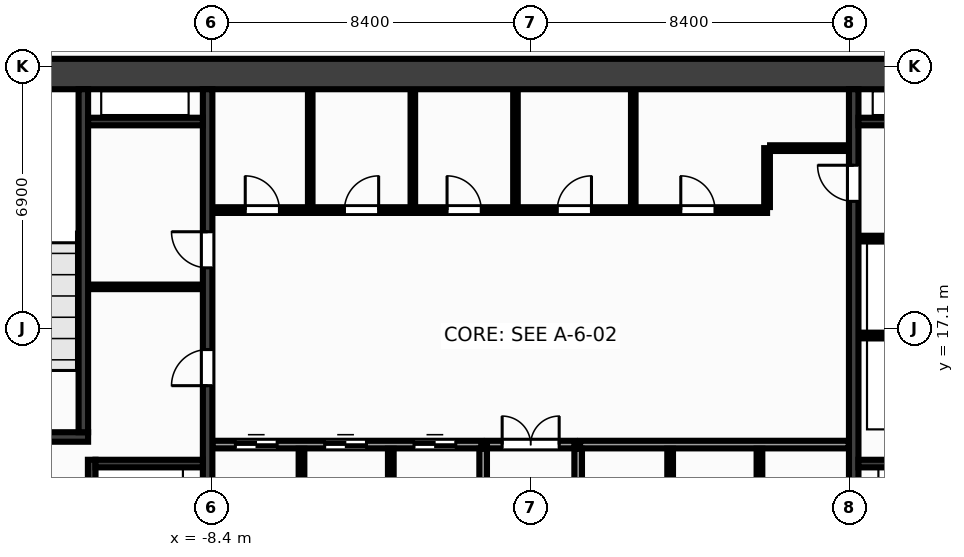
"""IFC4 building model, lengths in metres.
Left out: names, types, materials, properties, quantities, classifications, styles, units other than length and angle.
Written with IfcOpenShell. Run it as: python <this file> out.ifc"""

import sys

from ifc_helpers import new_model, si_unit, direction, frame, frame_2d, origin, place, context, subcontext, project, spatial, rectangle, extrude, source, transform, mapped, element, fill, save


model = new_model("IFC4")
c1 = context("Model", 3, precision=1e-05, world=origin(), true_north=direction((0.0, 1.0)))
c2 = subcontext(c1, "Body", "Model", "MODEL_VIEW")
j1 = project(units=[si_unit("LENGTHUNIT", "METRE"), si_unit("PLANEANGLEUNIT", "RADIAN")], contexts=[c1])
p1 = place(None, origin())
s1 = spatial("IfcSite", under=j1, at=p1, CompositionType="ELEMENT")
p2 = place(p1, origin())
s2 = spatial("IfcBuilding", under=s1, at=p2, CompositionType="ELEMENT")
p3 = place(p2, frame((0.0, 0.0, 18.95)))
s3 = spatial("IfcBuildingStorey", under=s2, at=p3, CompositionType="ELEMENT", Elevation=18.95)
m1 = source(origin(), c2, "Body", "SweptSolid", [
    extrude(rectangle(XDim=32.0, YDim=0.8, at=frame_2d((16.0, 0.0))), origin(), (0.0, 0.0, 1.0), 4.65),
])
p4 = place(p3, frame((-16.0, 23.8, 0.0), z_axis=(0.0, 0.0, 1.0), x_axis=(1.0, 0.0, 0.0)))
e1 = element("IfcWall", 1, at=p4, inside=s3, PredefinedType="SHEAR", context=c2, shape_type="MappedRepresentation", body=[
    mapped(m1, transform((0.0, 0.0, 0.0), x_axis=(1.0, 0.0, 0.0), y_axis=(0.0, 1.0, 0.0), z_axis=(0.0, 0.0, 1.0), scale=1.0)),
])
m2 = source(origin(), c2, "Body", "SweptSolid", [
    extrude(rectangle(XDim=12.8, YDim=0.25, at=frame_2d((6.4, 0.0))), origin(), (0.0, 0.0, 1.0), 4.65),
])
p5 = place(p3, frame((-8.5, 10.6, 0.0), z_axis=(0.0, 0.0, 1.0), x_axis=(0.0, 1.0, 0.0)))
e2 = element("IfcWall", 2, at=p5, inside=s3, PredefinedType="SHEAR", context=c2, shape_type="MappedRepresentation", body=[
    mapped(m2, transform((0.0, 0.0, 0.0), x_axis=(1.0, 0.0, 0.0), y_axis=(0.0, 1.0, 0.0), z_axis=(0.0, 0.0, 1.0), scale=1.0)),
])
p6 = place(p5, frame((5.0, 0.0, 0.0)))
e3 = element("IfcOpeningElement", 3, at=p6, cuts=e2, PredefinedType="OPENING", context=c2, shape_type="SweptSolid", body=[
    extrude(rectangle(XDim=0.95, YDim=2.15, at=frame_2d((0.475, 1.075))), frame((0.0, 0.137, 0.0), z_axis=(0.0, -1.0, 0.0), x_axis=(1.0, 0.0, 0.0)), (0.0, 0.0, 1.0), 0.274),
])
p7 = place(p5, frame((8.1, 0.0, 0.0)))
e4 = element("IfcOpeningElement", 4, at=p7, cuts=e2, PredefinedType="OPENING", context=c2, shape_type="SweptSolid", body=[
    extrude(rectangle(XDim=0.95, YDim=2.15, at=frame_2d((0.475, 1.075))), frame((0.0, 0.137, 0.0), z_axis=(0.0, -1.0, 0.0), x_axis=(1.0, 0.0, 0.0)), (0.0, 0.0, 1.0), 0.274),
])
p8 = place(p3, frame((8.5, 10.6, 0.0), z_axis=(0.0, 0.0, 1.0), x_axis=(0.0, 1.0, 0.0)))
e5 = element("IfcWall", 5, at=p8, inside=s3, PredefinedType="SHEAR", context=c2, shape_type="MappedRepresentation", body=[
    mapped(m2, transform((0.0, 0.0, 0.0), x_axis=(1.0, 0.0, 0.0), y_axis=(0.0, 1.0, 0.0), z_axis=(0.0, 0.0, 1.0), scale=1.0)),
])
p9 = place(p8, frame((9.85, 0.0, 0.0)))
e6 = element("IfcOpeningElement", 6, at=p9, cuts=e5, PredefinedType="OPENING", context=c2, shape_type="SweptSolid", body=[
    extrude(rectangle(XDim=0.95, YDim=2.15, at=frame_2d((0.475, 1.075))), frame((0.0, 0.137, 0.0), z_axis=(0.0, -1.0, 0.0), x_axis=(1.0, 0.0, 0.0)), (0.0, 0.0, 1.0), 0.274),
])
m3 = source(origin(), c2, "Body", "SweptSolid", [
    extrude(rectangle(XDim=3.555, YDim=0.25, at=frame_2d((1.777, 0.0))), origin(), (0.0, 0.0, 1.0), 4.65),
])
p10 = place(p3, frame((-15.2, 14.25, 0.0), z_axis=(0.0, 0.0, 1.0), x_axis=(1.0, 0.0, 0.0)))
e7 = element("IfcWall", 7, at=p10, inside=s3, PredefinedType="SHEAR", context=c2, shape_type="MappedRepresentation", body=[
    mapped(m3, transform((0.0, 0.0, 0.0), x_axis=(1.0, 0.0, 0.0), y_axis=(0.0, 1.0, 0.0), z_axis=(0.0, 0.0, 1.0), scale=1.0)),
])
p11 = place(p10, frame((0.95, 0.0, 0.0)))
e8 = element("IfcOpeningElement", 8, at=p11, cuts=e7, PredefinedType="OPENING", context=c2, shape_type="SweptSolid", body=[
    extrude(rectangle(XDim=1.6, YDim=2.15, at=frame_2d((0.8, 1.075))), frame((0.0, 0.137, 0.0), z_axis=(0.0, -1.0, 0.0), x_axis=(1.0, 0.0, 0.0)), (0.0, 0.0, 1.0), 0.274),
])
m4 = source(origin(), c2, "Body", "SweptSolid", [
    extrude(rectangle(XDim=9.025, YDim=0.25, at=frame_2d((4.512, 0.0))), origin(), (0.0, 0.0, 1.0), 4.65),
])
p12 = place(p3, frame((-11.77, 14.375, 0.0), z_axis=(0.0, 0.0, 1.0), x_axis=(0.0, 1.0, 0.0)))
e9 = element("IfcWall", 9, at=p12, inside=s3, PredefinedType="SHEAR", context=c2, shape_type="MappedRepresentation", body=[
    mapped(m4, transform((0.0, 0.0, 0.0), x_axis=(1.0, 0.0, 0.0), y_axis=(0.0, 1.0, 0.0), z_axis=(0.0, 0.0, 1.0), scale=1.0)),
])
m5 = source(origin(), c2, "Body", "SweptSolid", [
    extrude(rectangle(XDim=3.05, YDim=0.2, at=frame_2d((1.525, 0.0))), origin(), (0.0, 0.0, 1.0), 4.65),
])
p13 = place(p3, frame((-11.55, 10.6, 0.0), z_axis=(0.0, 0.0, 1.0), x_axis=(0.0, 1.0, 0.0)))
e10 = element("IfcWall", 10, at=p13, inside=s3, PredefinedType="SHEAR", context=c2, shape_type="MappedRepresentation", body=[
    mapped(m5, transform((0.0, 0.0, 0.0), x_axis=(1.0, 0.0, 0.0), y_axis=(0.0, 1.0, 0.0), z_axis=(0.0, 0.0, 1.0), scale=1.0)),
])
p14 = place(p13, frame((0.9, 0.0, 0.0)))
e11 = element("IfcOpeningElement", 11, at=p14, cuts=e10, PredefinedType="OPENING", context=c2, shape_type="SweptSolid", body=[
    extrude(rectangle(XDim=1.1, YDim=2.15, at=frame_2d((0.55, 1.075))), frame((0.0, 0.112, 0.0), z_axis=(0.0, -1.0, 0.0), x_axis=(1.0, 0.0, 0.0)), (0.0, 0.0, 1.0), 0.224),
])
m6 = source(origin(), c2, "Body", "SweptSolid", [
    extrude(rectangle(XDim=2.825, YDim=0.2, at=frame_2d((1.413, 0.0))), origin(), (0.0, 0.0, 1.0), 4.65),
])
for number, where, z_axis, x_axis in (
    (12, (-11.45, 13.55, 0.0), (0.0, 0.0, 1.0), (1.0, 0.0, 0.0)),
    (13, (8.625, 13.55, 0.0), (0.0, 0.0, 1.0), (1.0, 0.0, 0.0)),
):
    element("IfcWall", number, at=place(p3, frame(where, z_axis=z_axis, x_axis=x_axis)), inside=s3, PredefinedType="SHEAR", context=c2, shape_type="MappedRepresentation", body=[
        mapped(m6, transform((0.0, 0.0, 0.0), x_axis=(1.0, 0.0, 0.0), y_axis=(0.0, 1.0, 0.0), z_axis=(0.0, 0.0, 1.0), scale=1.0)),
    ])
m7 = source(origin(), c2, "Body", "SweptSolid", [
    extrude(rectangle(XDim=3.02, YDim=0.2, at=frame_2d((1.51, 0.0))), origin(), (0.0, 0.0, 1.0), 4.65),
])
for number, where, z_axis, x_axis in (
    (14, (-11.645, 22.55, 0.0), (0.0, 0.0, 1.0), (1.0, 0.0, 0.0)),
    (15, (8.625, 22.55, 0.0), (0.0, 0.0, 1.0), (1.0, 0.0, 0.0)),
):
    element("IfcWall", number, at=place(p3, frame(where, z_axis=z_axis, x_axis=x_axis)), inside=s3, PredefinedType="SHEAR", context=c2, shape_type="MappedRepresentation", body=[
        mapped(m7, transform((0.0, 0.0, 0.0), x_axis=(1.0, 0.0, 0.0), y_axis=(0.0, 1.0, 0.0), z_axis=(0.0, 0.0, 1.0), scale=1.0)),
    ])
m8 = source(origin(), c2, "Body", "SweptSolid", [
    extrude(rectangle(XDim=3.01, YDim=0.12, at=frame_2d((1.505, 0.0))), origin(), (0.0, 0.0, 1.0), 4.41),
])
p15 = place(p3, frame((-11.64, 18.2, 0.0), z_axis=(0.0, 0.0, 1.0), x_axis=(1.0, 0.0, 0.0)))
e16 = element("IfcWall", 16, at=p15, inside=s3, PredefinedType="PARTITIONING", context=c2, shape_type="MappedRepresentation", body=[
    mapped(m8, transform((0.0, 0.0, 0.0), x_axis=(1.0, 0.0, 0.0), y_axis=(0.0, 1.0, 0.0), z_axis=(0.0, 0.0, 1.0), scale=1.0)),
])
m9 = source(origin(), c2, "Body", "SweptSolid", [
    extrude(rectangle(XDim=3.01, YDim=0.15, at=frame_2d((1.505, 0.0))), origin(), (0.0, 0.0, 1.0), 4.41),
])
for number, where, z_axis, x_axis in (
    (17, (8.63, 16.92, 0.0), (0.0, 0.0, 1.0), (1.0, 0.0, 0.0)),
    (18, (8.63, 19.47, 0.0), (0.0, 0.0, 1.0), (1.0, 0.0, 0.0)),
):
    element("IfcWall", number, at=place(p3, frame(where, z_axis=z_axis, x_axis=x_axis)), inside=s3, PredefinedType="PARTITIONING", context=c2, shape_type="MappedRepresentation", body=[
        mapped(m9, transform((0.0, 0.0, 0.0), x_axis=(1.0, 0.0, 0.0), y_axis=(0.0, 1.0, 0.0), z_axis=(0.0, 0.0, 1.0), scale=1.0)),
    ])
m10 = source(origin(), c2, "Body", "SweptSolid", [
    extrude(rectangle(XDim=7.07, YDim=0.2, at=frame_2d((3.535, 0.0))), origin(), (0.0, 0.0, 1.0), 4.41),
])
p16 = place(p3, frame((-8.37, 14.05, 0.0), z_axis=(0.0, 0.0, 1.0), x_axis=(1.0, 0.0, 0.0)))
e19 = element("IfcWall", 19, at=p16, inside=s3, PredefinedType="PARTITIONING", context=c2, shape_type="MappedRepresentation", body=[
    mapped(m10, transform((0.0, 0.0, 0.0), x_axis=(1.0, 0.0, 0.0), y_axis=(0.0, 1.0, 0.0), z_axis=(0.0, 0.0, 1.0), scale=1.0)),
])
p17 = place(p16, frame((0.6, 0.0, 0.0)))
e20 = element("IfcOpeningElement", 20, at=p17, cuts=e19, PredefinedType="OPENING", context=c2, shape_type="SweptSolid", body=[
    extrude(rectangle(XDim=1.1, YDim=2.15, at=frame_2d((0.55, 1.075))), frame((0.0, 0.112, 0.0), z_axis=(0.0, -1.0, 0.0), x_axis=(1.0, 0.0, 0.0)), (0.0, 0.0, 1.0), 0.224),
])
p18 = place(p16, frame((2.95, 0.0, 0.0)))
e21 = element("IfcOpeningElement", 21, at=p18, cuts=e19, PredefinedType="OPENING", context=c2, shape_type="SweptSolid", body=[
    extrude(rectangle(XDim=1.1, YDim=2.15, at=frame_2d((0.55, 1.075))), frame((0.0, 0.112, 0.0), z_axis=(0.0, -1.0, 0.0), x_axis=(1.0, 0.0, 0.0)), (0.0, 0.0, 1.0), 0.224),
])
p19 = place(p16, frame((5.3, 0.0, 0.0)))
e22 = element("IfcOpeningElement", 22, at=p19, cuts=e19, PredefinedType="OPENING", context=c2, shape_type="SweptSolid", body=[
    extrude(rectangle(XDim=1.1, YDim=2.15, at=frame_2d((0.55, 1.075))), frame((0.0, 0.112, 0.0), z_axis=(0.0, -1.0, 0.0), x_axis=(1.0, 0.0, 0.0)), (0.0, 0.0, 1.0), 0.224),
])
p20 = place(p3, frame((1.3, 14.05, 0.0), z_axis=(0.0, 0.0, 1.0), x_axis=(1.0, 0.0, 0.0)))
e23 = element("IfcWall", 23, at=p20, inside=s3, PredefinedType="PARTITIONING", context=c2, shape_type="MappedRepresentation", body=[
    mapped(m10, transform((0.0, 0.0, 0.0), x_axis=(1.0, 0.0, 0.0), y_axis=(0.0, 1.0, 0.0), z_axis=(0.0, 0.0, 1.0), scale=1.0)),
])
m11 = source(origin(), c2, "Body", "SweptSolid", [
    extrude(rectangle(XDim=3.34, YDim=0.2, at=frame_2d((1.67, 0.0))), origin(), (0.0, 0.0, 1.0), 4.41),
])
for number, where, z_axis, x_axis in (
    (24, (-1.25, 10.6, 0.0), (0.0, 0.0, 1.0), (0.0, 1.0, 0.0)),
    (25, (1.25, 10.6, 0.0), (0.0, 0.0, 1.0), (0.0, 1.0, 0.0)),
):
    element("IfcWall", number, at=place(p3, frame(where, z_axis=z_axis, x_axis=x_axis)), inside=s3, PredefinedType="PARTITIONING", context=c2, shape_type="MappedRepresentation", body=[
        mapped(m11, transform((0.0, 0.0, 0.0), x_axis=(1.0, 0.0, 0.0), y_axis=(0.0, 1.0, 0.0), z_axis=(0.0, 0.0, 1.0), scale=1.0)),
    ])
m12 = source(origin(), c2, "Body", "SweptSolid", [
    extrude(rectangle(XDim=2.3, YDim=0.2, at=frame_2d((1.15, 0.0))), origin(), (0.0, 0.0, 1.0), 4.41),
])
p21 = place(p3, frame((-1.15, 14.05, 0.0), z_axis=(0.0, 0.0, 1.0), x_axis=(1.0, 0.0, 0.0)))
e26 = element("IfcWall", 26, at=p21, inside=s3, PredefinedType="PARTITIONING", context=c2, shape_type="MappedRepresentation", body=[
    mapped(m12, transform((0.0, 0.0, 0.0), x_axis=(1.0, 0.0, 0.0), y_axis=(0.0, 1.0, 0.0), z_axis=(0.0, 0.0, 1.0), scale=1.0)),
])
p22 = place(p21, frame((0.4, 0.0, 0.0)))
e27 = element("IfcOpeningElement", 27, at=p22, cuts=e26, PredefinedType="OPENING", context=c2, shape_type="SweptSolid", body=[
    extrude(rectangle(XDim=1.5, YDim=2.2, at=frame_2d((0.75, 1.1))), frame((0.0, 0.112, 0.0), z_axis=(0.0, -1.0, 0.0), x_axis=(1.0, 0.0, 0.0)), (0.0, 0.0, 1.0), 0.224),
])
m13 = source(origin(), c2, "Body", "SweptSolid", [
    extrude(rectangle(XDim=14.59, YDim=0.15, at=frame_2d((7.295, 0.0))), origin(), (0.0, 0.0, 1.0), 4.41),
])
p23 = place(p3, frame((-8.37, 20.22, 0.0), z_axis=(0.0, 0.0, 1.0), x_axis=(1.0, 0.0, 0.0)))
e28 = element("IfcWall", 28, at=p23, inside=s3, PredefinedType="PARTITIONING", context=c2, shape_type="MappedRepresentation", body=[
    mapped(m13, transform((0.0, 0.0, 0.0), x_axis=(1.0, 0.0, 0.0), y_axis=(0.0, 1.0, 0.0), z_axis=(0.0, 0.0, 1.0), scale=1.0)),
])
p24 = place(p23, frame((0.86, 0.0, 0.0)))
e29 = element("IfcOpeningElement", 29, at=p24, cuts=e28, PredefinedType="OPENING", context=c2, shape_type="SweptSolid", body=[
    extrude(rectangle(XDim=0.9, YDim=2.15, at=frame_2d((0.45, 1.075))), frame((0.0, 0.087, 0.0), z_axis=(0.0, -1.0, 0.0), x_axis=(1.0, 0.0, 0.0)), (0.0, 0.0, 1.0), 0.174),
])
p25 = place(p23, frame((3.47, 0.0, 0.0)))
e30 = element("IfcOpeningElement", 30, at=p25, cuts=e28, PredefinedType="OPENING", context=c2, shape_type="SweptSolid", body=[
    extrude(rectangle(XDim=0.9, YDim=2.15, at=frame_2d((0.45, 1.075))), frame((0.0, 0.087, 0.0), z_axis=(0.0, -1.0, 0.0), x_axis=(1.0, 0.0, 0.0)), (0.0, 0.0, 1.0), 0.174),
])
p26 = place(p23, frame((6.17, 0.0, 0.0)))
e31 = element("IfcOpeningElement", 31, at=p26, cuts=e28, PredefinedType="OPENING", context=c2, shape_type="SweptSolid", body=[
    extrude(rectangle(XDim=0.9, YDim=2.15, at=frame_2d((0.45, 1.075))), frame((0.0, 0.087, 0.0), z_axis=(0.0, -1.0, 0.0), x_axis=(1.0, 0.0, 0.0)), (0.0, 0.0, 1.0), 0.174),
])
p27 = place(p23, frame((9.07, 0.0, 0.0)))
e32 = element("IfcOpeningElement", 32, at=p27, cuts=e28, PredefinedType="OPENING", context=c2, shape_type="SweptSolid", body=[
    extrude(rectangle(XDim=0.9, YDim=2.15, at=frame_2d((0.45, 1.075))), frame((0.0, 0.087, 0.0), z_axis=(0.0, -1.0, 0.0), x_axis=(1.0, 0.0, 0.0)), (0.0, 0.0, 1.0), 0.174),
])
p28 = place(p23, frame((12.32, 0.0, 0.0)))
e33 = element("IfcOpeningElement", 33, at=p28, cuts=e28, PredefinedType="OPENING", context=c2, shape_type="SweptSolid", body=[
    extrude(rectangle(XDim=0.9, YDim=2.15, at=frame_2d((0.45, 1.075))), frame((0.0, 0.087, 0.0), z_axis=(0.0, -1.0, 0.0), x_axis=(1.0, 0.0, 0.0)), (0.0, 0.0, 1.0), 0.174),
])
m14 = source(origin(), c2, "Body", "SweptSolid", [
    extrude(rectangle(XDim=1.55, YDim=0.15, at=frame_2d((0.775, 0.0))), origin(), (0.0, 0.0, 1.0), 4.41),
])
p29 = place(p3, frame((6.22, 20.3, 0.0), z_axis=(0.0, 0.0, 1.0), x_axis=(0.0, 1.0, 0.0)))
e34 = element("IfcWall", 34, at=p29, inside=s3, PredefinedType="PARTITIONING", context=c2, shape_type="MappedRepresentation", body=[
    mapped(m14, transform((0.0, 0.0, 0.0), x_axis=(1.0, 0.0, 0.0), y_axis=(0.0, 1.0, 0.0), z_axis=(0.0, 0.0, 1.0), scale=1.0)),
])
m15 = source(origin(), c2, "Body", "SweptSolid", [
    extrude(rectangle(XDim=2.07, YDim=0.15, at=frame_2d((1.035, 0.0))), origin(), (0.0, 0.0, 1.0), 4.41),
])
p30 = place(p3, frame((6.3, 21.85, 0.0), z_axis=(0.0, 0.0, 1.0), x_axis=(1.0, 0.0, 0.0)))
e35 = element("IfcWall", 35, at=p30, inside=s3, PredefinedType="PARTITIONING", context=c2, shape_type="MappedRepresentation", body=[
    mapped(m15, transform((0.0, 0.0, 0.0), x_axis=(1.0, 0.0, 0.0), y_axis=(0.0, 1.0, 0.0), z_axis=(0.0, 0.0, 1.0), scale=1.0)),
])
m16 = source(origin(), c2, "Body", "SweptSolid", [
    extrude(rectangle(XDim=3.34, YDim=0.15, at=frame_2d((1.67, 0.0))), origin(), (0.0, 0.0, 1.0), 4.41),
])
for number, where, z_axis, x_axis in (
    (36, (-6.03, 10.6, 0.0), (0.0, 0.0, 1.0), (0.0, 1.0, 0.0)),
    (37, (-3.68, 10.6, 0.0), (0.0, 0.0, 1.0), (0.0, 1.0, 0.0)),
    (38, (3.67, 10.6, 0.0), (0.0, 0.0, 1.0), (0.0, 1.0, 0.0)),
    (39, (6.02, 10.6, 0.0), (0.0, 0.0, 1.0), (0.0, 1.0, 0.0)),
):
    element("IfcWall", number, at=place(p3, frame(where, z_axis=z_axis, x_axis=x_axis)), inside=s3, PredefinedType="PARTITIONING", context=c2, shape_type="MappedRepresentation", body=[
        mapped(m16, transform((0.0, 0.0, 0.0), x_axis=(1.0, 0.0, 0.0), y_axis=(0.0, 1.0, 0.0), z_axis=(0.0, 0.0, 1.0), scale=1.0)),
    ])
m17 = source(origin(), c2, "Body", "SweptSolid", [
    extrude(rectangle(XDim=3.04, YDim=0.12, at=frame_2d((1.52, 0.0))), origin(), (0.0, 0.0, 1.0), 4.41),
])
for number, where, z_axis, x_axis in (
    (40, (-5.8, 20.32, 0.0), (0.0, 0.0, 1.0), (0.0, 1.0, 0.0)),
    (41, (-3.1, 20.32, 0.0), (0.0, 0.0, 1.0), (0.0, 1.0, 0.0)),
    (42, (-0.4, 20.32, 0.0), (0.0, 0.0, 1.0), (0.0, 1.0, 0.0)),
    (43, (2.7, 20.32, 0.0), (0.0, 0.0, 1.0), (0.0, 1.0, 0.0)),
):
    element("IfcWall", number, at=place(p3, frame(where, z_axis=z_axis, x_axis=x_axis)), inside=s3, PredefinedType="PARTITIONING", context=c2, shape_type="MappedRepresentation", body=[
        mapped(m17, transform((0.0, 0.0, 0.0), x_axis=(1.0, 0.0, 0.0), y_axis=(0.0, 1.0, 0.0), z_axis=(0.0, 0.0, 1.0), scale=1.0)),
    ])
m18 = source(origin(), c2, "Body", "SweptSolid", [
    extrude(rectangle(XDim=0.95, YDim=2.15, at=frame_2d((0.475, 1.075))), frame((0.0, 0.025, 0.0), z_axis=(0.0, -1.0, 0.0), x_axis=(1.0, 0.0, 0.0)), (0.0, 0.0, 1.0), 0.05),
])
p31 = place(p6, origin())
e44 = element("IfcDoor", 44, at=p31, inside=s3, OperationType="SINGLE_SWING_LEFT", PredefinedType="DOOR", context=c2, shape_type="MappedRepresentation", body=[
    mapped(m18, transform((0.0, 0.0, 0.0), x_axis=(1.0, 0.0, 0.0), y_axis=(0.0, 1.0, 0.0), z_axis=(0.0, 0.0, 1.0), scale=1.0)),
])
fill(e3, e44)
p32 = place(p7, origin())
e45 = element("IfcDoor", 45, at=p32, inside=s3, OperationType="SINGLE_SWING_RIGHT", PredefinedType="DOOR", context=c2, shape_type="MappedRepresentation", body=[
    mapped(m18, transform((0.0, 0.0, 0.0), x_axis=(1.0, 0.0, 0.0), y_axis=(0.0, 1.0, 0.0), z_axis=(0.0, 0.0, 1.0), scale=1.0)),
])
fill(e4, e45)
m19 = source(origin(), c2, "Body", "SweptSolid", [
    extrude(rectangle(XDim=0.95, YDim=2.15, at=frame_2d((0.475, 1.075))), frame((0.0, 0.025, 0.0), z_axis=(0.0, -1.0, 0.0), x_axis=(1.0, 0.0, 0.0)), (0.0, 0.0, 1.0), 0.05),
])
p33 = place(p9, origin())
e46 = element("IfcDoor", 46, at=p33, inside=s3, OperationType="SINGLE_SWING_RIGHT", PredefinedType="DOOR", context=c2, shape_type="MappedRepresentation", body=[
    mapped(m19, transform((0.0, 0.0, 0.0), x_axis=(1.0, 0.0, 0.0), y_axis=(0.0, 1.0, 0.0), z_axis=(0.0, 0.0, 1.0), scale=1.0)),
])
fill(e6, e46)
m20 = source(origin(), c2, "Body", "SweptSolid", [
    extrude(rectangle(XDim=1.1, YDim=2.15, at=frame_2d((0.55, 1.075))), frame((0.0, 0.025, 0.0), z_axis=(0.0, -1.0, 0.0), x_axis=(1.0, 0.0, 0.0)), (0.0, 0.0, 1.0), 0.05),
])
p34 = place(p17, origin())
e47 = element("IfcDoor", 47, at=p34, inside=s3, OperationType="DOUBLE_DOOR_SLIDING", PredefinedType="DOOR", context=c2, shape_type="MappedRepresentation", body=[
    mapped(m20, transform((0.0, 0.0, 0.0), x_axis=(1.0, 0.0, 0.0), y_axis=(0.0, 1.0, 0.0), z_axis=(0.0, 0.0, 1.0), scale=1.0)),
])
fill(e20, e47)
p35 = place(p18, origin())
e48 = element("IfcDoor", 48, at=p35, inside=s3, OperationType="DOUBLE_DOOR_SLIDING", PredefinedType="DOOR", context=c2, shape_type="MappedRepresentation", body=[
    mapped(m20, transform((0.0, 0.0, 0.0), x_axis=(1.0, 0.0, 0.0), y_axis=(0.0, 1.0, 0.0), z_axis=(0.0, 0.0, 1.0), scale=1.0)),
])
fill(e21, e48)
p36 = place(p19, origin())
e49 = element("IfcDoor", 49, at=p36, inside=s3, OperationType="DOUBLE_DOOR_SLIDING", PredefinedType="DOOR", context=c2, shape_type="MappedRepresentation", body=[
    mapped(m20, transform((0.0, 0.0, 0.0), x_axis=(1.0, 0.0, 0.0), y_axis=(0.0, 1.0, 0.0), z_axis=(0.0, 0.0, 1.0), scale=1.0)),
])
fill(e22, e49)
m21 = source(origin(), c2, "Body", "SweptSolid", [
    extrude(rectangle(XDim=1.5, YDim=2.2, at=frame_2d((0.75, 1.1))), frame((0.0, 0.025, 0.0), z_axis=(0.0, -1.0, 0.0), x_axis=(1.0, 0.0, 0.0)), (0.0, 0.0, 1.0), 0.05),
])
p37 = place(p22, origin())
e50 = element("IfcDoor", 50, at=p37, inside=s3, OperationType="DOUBLE_DOOR_SINGLE_SWING", PredefinedType="DOOR", context=c2, shape_type="MappedRepresentation", body=[
    mapped(m21, transform((0.0, 0.0, 0.0), x_axis=(1.0, 0.0, 0.0), y_axis=(0.0, 1.0, 0.0), z_axis=(0.0, 0.0, 1.0), scale=1.0)),
])
fill(e27, e50)
m22 = source(origin(), c2, "Body", "SweptSolid", [
    extrude(rectangle(XDim=0.9, YDim=2.15, at=frame_2d((0.45, 1.075))), frame((0.0, 0.025, 0.0), z_axis=(0.0, -1.0, 0.0), x_axis=(1.0, 0.0, 0.0)), (0.0, 0.0, 1.0), 0.05),
])
p38 = place(p24, origin())
e51 = element("IfcDoor", 51, at=p38, inside=s3, OperationType="SINGLE_SWING_LEFT", PredefinedType="DOOR", context=c2, shape_type="MappedRepresentation", body=[
    mapped(m22, transform((0.0, 0.0, 0.0), x_axis=(1.0, 0.0, 0.0), y_axis=(0.0, 1.0, 0.0), z_axis=(0.0, 0.0, 1.0), scale=1.0)),
])
fill(e29, e51)
p39 = place(p25, origin())
e52 = element("IfcDoor", 52, at=p39, inside=s3, OperationType="SINGLE_SWING_RIGHT", PredefinedType="DOOR", context=c2, shape_type="MappedRepresentation", body=[
    mapped(m22, transform((0.0, 0.0, 0.0), x_axis=(1.0, 0.0, 0.0), y_axis=(0.0, 1.0, 0.0), z_axis=(0.0, 0.0, 1.0), scale=1.0)),
])
fill(e30, e52)
p40 = place(p26, origin())
e53 = element("IfcDoor", 53, at=p40, inside=s3, OperationType="SINGLE_SWING_LEFT", PredefinedType="DOOR", context=c2, shape_type="MappedRepresentation", body=[
    mapped(m22, transform((0.0, 0.0, 0.0), x_axis=(1.0, 0.0, 0.0), y_axis=(0.0, 1.0, 0.0), z_axis=(0.0, 0.0, 1.0), scale=1.0)),
])
fill(e31, e53)
p41 = place(p27, origin())
e54 = element("IfcDoor", 54, at=p41, inside=s3, OperationType="SINGLE_SWING_RIGHT", PredefinedType="DOOR", context=c2, shape_type="MappedRepresentation", body=[
    mapped(m22, transform((0.0, 0.0, 0.0), x_axis=(1.0, 0.0, 0.0), y_axis=(0.0, 1.0, 0.0), z_axis=(0.0, 0.0, 1.0), scale=1.0)),
])
fill(e32, e54)
p42 = place(p28, origin())
e55 = element("IfcDoor", 55, at=p42, inside=s3, OperationType="SINGLE_SWING_LEFT", PredefinedType="DOOR", context=c2, shape_type="MappedRepresentation", body=[
    mapped(m22, transform((0.0, 0.0, 0.0), x_axis=(1.0, 0.0, 0.0), y_axis=(0.0, 1.0, 0.0), z_axis=(0.0, 0.0, 1.0), scale=1.0)),
])
fill(e33, e55)
save(model, sys.argv[1])
